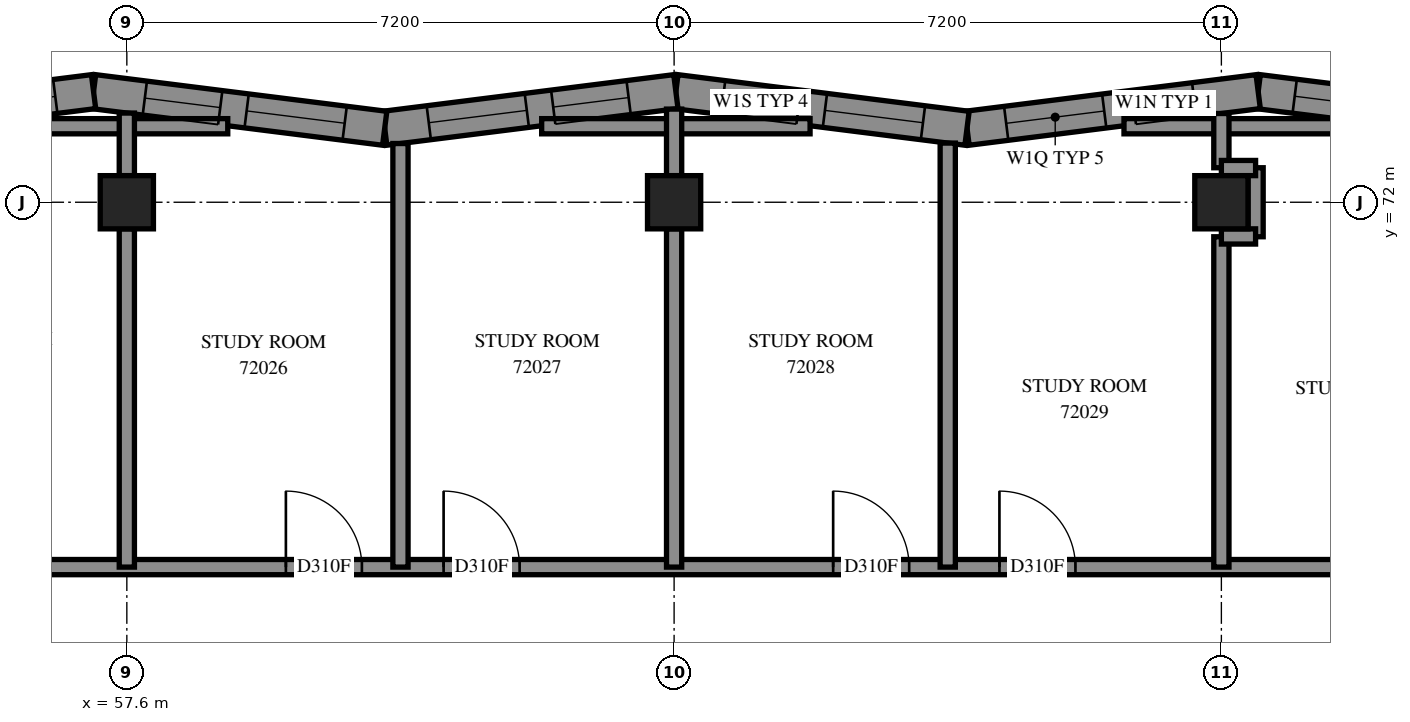
"""IFC4 building model, lengths in metres.
Left out: names, types, materials, properties, quantities, classifications, styles, units other than length and angle.
Written with IfcOpenShell. Run it as: python <this file> out.ifc"""

import sys

from ifc_helpers import new_model, si_unit, direction, frame, frame_2d, origin, origin_2d, place, context, subcontext, project, spatial, polyline, rectangle, outline, extrude, element, fill, save


model = new_model("IFC4")
c1 = context("Model", 3, precision=1e-05, world=origin(), true_north=direction((0.0, 1.0)))
c2 = subcontext(c1, "Body", "Model", "MODEL_VIEW")
j1 = project(units=[si_unit("LENGTHUNIT", "METRE"), si_unit("PLANEANGLEUNIT", "RADIAN")], contexts=[c1])
p1 = place(None, origin())
s1 = spatial("IfcSite", under=j1, at=p1, CompositionType="ELEMENT")
p2 = place(p1, origin())
s2 = spatial("IfcBuilding", under=s1, at=p2, CompositionType="ELEMENT")
p3 = place(p2, frame((0.0, 0.0, 264.2)))
s3 = spatial("IfcBuildingStorey", under=s2, at=p3, CompositionType="ELEMENT", Elevation=264.2)
for number, where, z_axis, x_axis in (
    (1, (57.6, 72.0, 0.0), (0.0, 0.0, 1.0), (1.0, 0.0, 0.0)),
    (2, (64.8, 72.0, 0.0), (0.0, 0.0, 1.0), (1.0, 0.0, 0.0)),
    (3, (72.0, 72.0, 0.0), (0.0, 0.0, 1.0), (1.0, 0.0, 0.0)),
):
    element("IfcColumn", number, at=place(p3, frame(where, z_axis=z_axis, x_axis=x_axis)), inside=s3, PredefinedType="COLUMN", context=c2, shape_type="SweptSolid", body=[
        extrude(rectangle(XDim=0.7, YDim=0.7, at=origin_2d()), origin(), (0.0, 0.0, 1.0), 3.1),
    ])
p4 = place(p3, frame((76.332, 72.971, 0.0), z_axis=(0.0, 0.0, 1.0), x_axis=(-0.9921783841, 0.1248280981, 0.0)))
e4 = element("IfcWall", 4, at=p4, inside=s3, PredefinedType="SOLIDWALL", context=c2, shape_type="SweptSolid", body=[
    extrude(outline(polyline([(0.046, -0.225), (3.906, -0.225), (3.85, 0.225), (-0.046, 0.225), (0.046, -0.225)])), origin(), (0.0, 0.0, 1.0), 3.1),
])
p5 = place(p4, frame((2.194, 0.0, 0.45)))
e5 = element("IfcOpeningElement", 5, at=p5, cuts=e4, PredefinedType="OPENING", context=c2, shape_type="SweptSolid", body=[
    extrude(rectangle(XDim=1.2, YDim=2.55, at=frame_2d((0.6, 1.275))), frame((0.0, 0.235, 0.0), z_axis=(0.0, -1.0, 0.0), x_axis=(1.0, 0.0, 0.0)), (0.0, 0.0, 1.0), 0.47),
])
p6 = place(p3, frame((72.484, 73.455, 0.0), z_axis=(0.0, 0.0, 1.0), x_axis=(-0.9921759282, -0.1248476171, 0.0)))
e6 = element("IfcWall", 6, at=p6, inside=s3, PredefinedType="SOLIDWALL", context=c2, shape_type="SweptSolid", body=[
    extrude(outline(polyline([(-0.028, -0.225), (3.832, -0.225), (3.889, 0.225), (0.028, 0.225), (-0.028, -0.225)])), origin(), (0.0, 0.0, 1.0), 3.1),
])
p7 = place(p6, frame((2.042, 0.0, 0.45)))
e7 = element("IfcOpeningElement", 7, at=p7, cuts=e6, PredefinedType="OPENING", context=c2, shape_type="SweptSolid", body=[
    extrude(rectangle(XDim=1.3, YDim=2.5, at=frame_2d((0.65, 1.25))), frame((0.0, 0.235, 0.0), z_axis=(0.0, -1.0, 0.0), x_axis=(1.0, 0.0, 0.0)), (0.0, 0.0, 1.0), 0.47),
])
p8 = place(p6, frame((0.849, 0.0, 0.45)))
e8 = element("IfcOpeningElement", 8, at=p8, cuts=e6, PredefinedType="OPENING", context=c2, shape_type="SweptSolid", body=[
    extrude(rectangle(XDim=0.8, YDim=2.5, at=frame_2d((0.4, 1.25))), frame((0.0, 0.235, 0.0), z_axis=(0.0, -1.0, 0.0), x_axis=(1.0, 0.0, 0.0)), (0.0, 0.0, 1.0), 0.47),
])
p9 = place(p3, frame((68.654, 72.973, 0.0), z_axis=(0.0, 0.0, 1.0), x_axis=(-0.9921759282, 0.1248476171, 0.0)))
e9 = element("IfcWall", 9, at=p9, inside=s3, PredefinedType="SOLIDWALL", context=c2, shape_type="SweptSolid", body=[
    extrude(outline(polyline([(0.028, -0.225), (3.889, -0.225), (3.832, 0.225), (-0.028, 0.225), (0.028, -0.225)])), origin(), (0.0, 0.0, 1.0), 3.1),
])
p10 = place(p9, frame((0.584, 0.0, 0.45)))
e10 = element("IfcOpeningElement", 10, at=p10, cuts=e9, PredefinedType="OPENING", context=c2, shape_type="SweptSolid", body=[
    extrude(rectangle(XDim=1.3, YDim=2.5, at=frame_2d((0.65, 1.25))), frame((0.0, 0.235, 0.0), z_axis=(0.0, -1.0, 0.0), x_axis=(1.0, 0.0, 0.0)), (0.0, 0.0, 1.0), 0.47),
])
p11 = place(p9, frame((2.234, 0.0, 0.45)))
e11 = element("IfcOpeningElement", 11, at=p11, cuts=e9, PredefinedType="OPENING", context=c2, shape_type="SweptSolid", body=[
    extrude(rectangle(XDim=1.0, YDim=2.5, at=frame_2d((0.5, 1.25))), frame((0.0, 0.235, 0.0), z_axis=(0.0, -1.0, 0.0), x_axis=(1.0, 0.0, 0.0)), (0.0, 0.0, 1.0), 0.47),
])
p12 = place(p3, frame((64.823, 73.455, 0.0), z_axis=(0.0, 0.0, 1.0), x_axis=(-0.9921759282, -0.1248476171, 0.0)))
e12 = element("IfcWall", 12, at=p12, inside=s3, PredefinedType="SOLIDWALL", context=c2, shape_type="SweptSolid", body=[
    extrude(outline(polyline([(-0.028, -0.225), (3.832, -0.225), (3.889, 0.225), (0.028, 0.225), (-0.028, -0.225)])), origin(), (0.0, 0.0, 1.0), 3.1),
])
p13 = place(p12, frame((0.626, 0.0, 0.45)))
e13 = element("IfcOpeningElement", 13, at=p13, cuts=e12, PredefinedType="OPENING", context=c2, shape_type="SweptSolid", body=[
    extrude(rectangle(XDim=1.0, YDim=2.5, at=frame_2d((0.5, 1.25))), frame((0.0, 0.235, 0.0), z_axis=(0.0, -1.0, 0.0), x_axis=(1.0, 0.0, 0.0)), (0.0, 0.0, 1.0), 0.47),
])
p14 = place(p12, frame((1.976, 0.0, 0.45)))
e14 = element("IfcOpeningElement", 14, at=p14, cuts=e12, PredefinedType="OPENING", context=c2, shape_type="SweptSolid", body=[
    extrude(rectangle(XDim=1.3, YDim=2.5, at=frame_2d((0.65, 1.25))), frame((0.0, 0.235, 0.0), z_axis=(0.0, -1.0, 0.0), x_axis=(1.0, 0.0, 0.0)), (0.0, 0.0, 1.0), 0.47),
])
p15 = place(p3, frame((60.993, 72.973, 0.0), z_axis=(0.0, 0.0, 1.0), x_axis=(-0.9921759282, 0.1248476171, 0.0)))
e15 = element("IfcWall", 15, at=p15, inside=s3, PredefinedType="SOLIDWALL", context=c2, shape_type="SweptSolid", body=[
    extrude(outline(polyline([(0.028, -0.225), (3.889, -0.225), (3.832, 0.225), (-0.028, 0.225), (0.028, -0.225)])), origin(), (0.0, 0.0, 1.0), 3.1),
])
p16 = place(p15, frame((0.531, 0.0, 0.45)))
e16 = element("IfcOpeningElement", 16, at=p16, cuts=e15, PredefinedType="OPENING", context=c2, shape_type="SweptSolid", body=[
    extrude(rectangle(XDim=1.3, YDim=2.5, at=frame_2d((0.65, 1.25))), frame((0.0, 0.235, 0.0), z_axis=(0.0, -1.0, 0.0), x_axis=(1.0, 0.0, 0.0)), (0.0, 0.0, 1.0), 0.47),
])
p17 = place(p15, frame((2.181, 0.0, 0.45)))
e17 = element("IfcOpeningElement", 17, at=p17, cuts=e15, PredefinedType="OPENING", context=c2, shape_type="SweptSolid", body=[
    extrude(rectangle(XDim=1.0, YDim=2.5, at=frame_2d((0.5, 1.25))), frame((0.0, 0.235, 0.0), z_axis=(0.0, -1.0, 0.0), x_axis=(1.0, 0.0, 0.0)), (0.0, 0.0, 1.0), 0.47),
])
p18 = place(p3, frame((57.162, 73.455, 0.0), z_axis=(0.0, 0.0, 1.0), x_axis=(-0.9921763319, -0.1248444087, 0.0)))
e18 = element("IfcWall", 18, at=p18, inside=s3, PredefinedType="SOLIDWALL", context=c2, shape_type="SweptSolid", body=[
    extrude(outline(polyline([(-0.028, -0.225), (3.832, -0.225), (3.889, 0.225), (0.028, 0.225), (-0.028, -0.225)])), origin(), (0.0, 0.0, 1.0), 3.1),
])
p19 = place(p18, frame((0.508, 0.0, 0.45)))
e19 = element("IfcOpeningElement", 19, at=p19, cuts=e18, PredefinedType="OPENING", context=c2, shape_type="SweptSolid", body=[
    extrude(rectangle(XDim=1.2, YDim=2.55, at=frame_2d((0.6, 1.275))), frame((0.0, 0.235, 0.0), z_axis=(0.0, -1.0, 0.0), x_axis=(1.0, 0.0, 0.0)), (0.0, 0.0, 1.0), 0.47),
])
p20 = place(p3, frame((55.2, 67.2, 0.0), z_axis=(0.0, 0.0, 1.0), x_axis=(1.0, 0.0, 0.0)))
e20 = element("IfcWall", 20, at=p20, inside=s3, PredefinedType="PARTITIONING", context=c2, shape_type="SweptSolid", body=[
    extrude(rectangle(XDim=19.2, YDim=0.2, at=frame_2d((9.6, 0.0))), origin(), (0.0, 0.0, 1.0), 3.1),
])
p21 = place(p20, frame((4.492, 0.0, 0.0)))
e21 = element("IfcOpeningElement", 21, at=p21, cuts=e20, PredefinedType="OPENING", context=c2, shape_type="SweptSolid", body=[
    extrude(rectangle(XDim=1.0, YDim=2.1, at=frame_2d((0.5, 1.05))), frame((0.0, 0.11, 0.0), z_axis=(0.0, -1.0, 0.0), x_axis=(1.0, 0.0, 0.0)), (0.0, 0.0, 1.0), 0.22),
])
p22 = place(p20, frame((6.567, 0.0, 0.0)))
e22 = element("IfcOpeningElement", 22, at=p22, cuts=e20, PredefinedType="OPENING", context=c2, shape_type="SweptSolid", body=[
    extrude(rectangle(XDim=1.0, YDim=2.1, at=frame_2d((0.5, 1.05))), frame((0.0, 0.11, 0.0), z_axis=(0.0, -1.0, 0.0), x_axis=(1.0, 0.0, 0.0)), (0.0, 0.0, 1.0), 0.22),
])
p23 = place(p20, frame((11.693, 0.0, 0.0)))
e23 = element("IfcOpeningElement", 23, at=p23, cuts=e20, PredefinedType="OPENING", context=c2, shape_type="SweptSolid", body=[
    extrude(rectangle(XDim=1.0, YDim=2.1, at=frame_2d((0.5, 1.05))), frame((0.0, 0.11, 0.0), z_axis=(0.0, -1.0, 0.0), x_axis=(1.0, 0.0, 0.0)), (0.0, 0.0, 1.0), 0.22),
])
p24 = place(p20, frame((13.88, 0.0, 0.0)))
e24 = element("IfcOpeningElement", 24, at=p24, cuts=e20, PredefinedType="OPENING", context=c2, shape_type="SweptSolid", body=[
    extrude(rectangle(XDim=1.0, YDim=2.1, at=frame_2d((0.5, 1.05))), frame((0.0, 0.11, 0.0), z_axis=(0.0, -1.0, 0.0), x_axis=(1.0, 0.0, 0.0)), (0.0, 0.0, 1.0), 0.22),
])
p25 = place(p3, frame((68.4, 67.2, 0.0), z_axis=(0.0, 0.0, 1.0), x_axis=(0.0, 1.0, 0.0)))
e25 = element("IfcWall", 25, at=p25, inside=s3, PredefinedType="PARTITIONING", context=c2, shape_type="SweptSolid", body=[
    extrude(rectangle(XDim=5.578, YDim=0.2, at=frame_2d((2.789, 0.0))), origin(), (0.0, 0.0, 1.0), 3.1),
])
p26 = place(p3, frame((61.2, 67.2, 0.0), z_axis=(0.0, 0.0, 1.0), x_axis=(0.0, 1.0, 0.0)))
e26 = element("IfcWall", 26, at=p26, inside=s3, PredefinedType="PARTITIONING", context=c2, shape_type="SweptSolid", body=[
    extrude(rectangle(XDim=5.572, YDim=0.2, at=frame_2d((2.786, 0.0))), origin(), (0.0, 0.0, 1.0), 3.1),
])
for number, where, z_axis, x_axis in (
    (27, (57.6, 67.2, 0.0), (0.0, 0.0, 1.0), (0.0, 1.0, 0.0)),
    (28, (64.8, 67.2, 0.0), (0.0, 0.0, 1.0), (0.0, 1.0, 0.0)),
):
    element("IfcWall", number, at=place(p3, frame(where, z_axis=z_axis, x_axis=x_axis)), inside=s3, PredefinedType="PARTITIONING", context=c2, shape_type="SweptSolid", body=[
        extrude(rectangle(XDim=4.45, YDim=0.2, at=frame_2d((2.225, 0.0))), origin(), (0.0, 0.0, 1.0), 3.1),
    ])
p27 = place(p3, frame((72.0, 67.2, 0.0), z_axis=(0.0, 0.0, 1.0), x_axis=(0.0, 1.0, 0.0)))
e29 = element("IfcWall", 29, at=p27, inside=s3, PredefinedType="PARTITIONING", context=c2, shape_type="SweptSolid", body=[
    extrude(rectangle(XDim=4.346, YDim=0.2, at=frame_2d((2.173, 0.0))), origin(), (0.0, 0.0, 1.0), 3.1),
])
for number, where, z_axis, x_axis in (
    (30, (70.719, 73.0, 0.0), (0.0, 0.0, 1.0), (1.0, 0.0, 0.0)),
    (31, (55.397, 73.0, 0.0), (0.0, 0.0, 1.0), (1.0, 0.0, 0.0)),
):
    element("IfcWall", number, at=place(p3, frame(where, z_axis=z_axis, x_axis=x_axis)), inside=s3, PredefinedType="PARTITIONING", context=c2, shape_type="SweptSolid", body=[
        extrude(rectangle(XDim=3.531, YDim=0.2, at=frame_2d((1.766, 0.0))), origin(), (0.0, 0.0, 1.0), 3.1),
    ])
p28 = place(p3, frame((63.058, 73.0, 0.0), z_axis=(0.0, 0.0, 1.0), x_axis=(1.0, 0.0, 0.0)))
e32 = element("IfcWall", 32, at=p28, inside=s3, PredefinedType="PARTITIONING", context=c2, shape_type="SweptSolid", body=[
    extrude(rectangle(XDim=3.531, YDim=0.2, at=frame_2d((1.766, 0.0))), origin(), (0.0, 0.0, 1.0), 3.1),
])
p29 = place(p3, frame((72.45, 71.546, 0.0), z_axis=(0.0, 0.0, 1.0), x_axis=(0.0, 1.0, 0.0)))
e33 = element("IfcWall", 33, at=p29, inside=s3, PredefinedType="PARTITIONING", context=c2, shape_type="SweptSolid", body=[
    extrude(rectangle(XDim=0.908, YDim=0.2, at=frame_2d((0.454, 0.0))), origin(), (0.0, 0.0, 1.0), 3.1),
])
p30 = place(p3, frame((57.6, 72.35, 0.0), z_axis=(0.0, 0.0, 1.0), x_axis=(0.0, 1.0, 0.0)))
e34 = element("IfcWall", 34, at=p30, inside=s3, PredefinedType="PARTITIONING", context=c2, shape_type="SweptSolid", body=[
    extrude(rectangle(XDim=0.823, YDim=0.2, at=frame_2d((0.412, 0.0))), origin(), (0.0, 0.0, 1.0), 3.1),
])
p31 = place(p3, frame((64.8, 72.35, 0.0), z_axis=(0.0, 0.0, 1.0), x_axis=(0.0, 1.0, 0.0)))
e35 = element("IfcWall", 35, at=p31, inside=s3, PredefinedType="PARTITIONING", context=c2, shape_type="SweptSolid", body=[
    extrude(rectangle(XDim=0.875, YDim=0.2, at=frame_2d((0.438, 0.0))), origin(), (0.0, 0.0, 1.0), 3.1),
])
p32 = place(p3, frame((72.0, 72.454, 0.0), z_axis=(0.0, 0.0, 1.0), x_axis=(0.0, 1.0, 0.0)))
e36 = element("IfcWall", 36, at=p32, inside=s3, PredefinedType="PARTITIONING", context=c2, shape_type="SweptSolid", body=[
    extrude(rectangle(XDim=0.714, YDim=0.2, at=frame_2d((0.357, 0.0))), origin(), (0.0, 0.0, 1.0), 3.1),
])
for number, where, z_axis, x_axis in (
    (37, (72.0, 71.55, 0.0), (0.0, 0.0, 1.0), (1.0, 0.0, 0.0)),
    (38, (72.0, 72.45, 0.0), (0.0, 0.0, 1.0), (1.0, 0.0, 0.0)),
):
    element("IfcWall", number, at=place(p3, frame(where, z_axis=z_axis, x_axis=x_axis)), inside=s3, PredefinedType="PARTITIONING", context=c2, shape_type="SweptSolid", body=[
        extrude(rectangle(XDim=0.45, YDim=0.2, at=frame_2d((0.225, 0.0))), origin(), (0.0, 0.0, 1.0), 3.1),
    ])
p33 = place(p5, origin())
e39 = element("IfcWindow", 39, at=p33, inside=s3, PartitioningType="SINGLE_PANEL", PredefinedType="WINDOW", context=c2, shape_type="SweptSolid", body=[
    extrude(rectangle(XDim=1.2, YDim=2.55, at=frame_2d((0.6, 1.275))), frame((0.0, 0.115, 0.0), z_axis=(0.0, -1.0, 0.0), x_axis=(1.0, 0.0, 0.0)), (0.0, 0.0, 1.0), 0.06),
])
fill(e5, e39)
p34 = place(p19, origin())
e40 = element("IfcWindow", 40, at=p34, inside=s3, PartitioningType="SINGLE_PANEL", PredefinedType="WINDOW", context=c2, shape_type="SweptSolid", body=[
    extrude(rectangle(XDim=1.2, YDim=2.55, at=frame_2d((0.6, 1.275))), frame((0.0, 0.105, 0.0), z_axis=(0.0, -1.0, 0.0), x_axis=(1.0, 0.0, 0.0)), (0.0, 0.0, 1.0), 0.06),
])
fill(e19, e40)
p35 = place(p21, origin())
e41 = element("IfcDoor", 41, at=p35, inside=s3, OperationType="SINGLE_SWING_RIGHT", PredefinedType="DOOR", context=c2, shape_type="SweptSolid", body=[
    extrude(rectangle(XDim=1.0, YDim=2.1, at=frame_2d((0.5, 1.05))), frame((0.0, 0.025, 0.0), z_axis=(0.0, -1.0, 0.0), x_axis=(1.0, 0.0, 0.0)), (0.0, 0.0, 1.0), 0.05),
])
fill(e21, e41)
p36 = place(p22, origin())
e42 = element("IfcDoor", 42, at=p36, inside=s3, OperationType="SINGLE_SWING_LEFT", PredefinedType="DOOR", context=c2, shape_type="SweptSolid", body=[
    extrude(rectangle(XDim=1.0, YDim=2.1, at=frame_2d((0.5, 1.05))), frame((0.0, 0.025, 0.0), z_axis=(0.0, -1.0, 0.0), x_axis=(1.0, 0.0, 0.0)), (0.0, 0.0, 1.0), 0.05),
])
fill(e22, e42)
p37 = place(p23, origin())
e43 = element("IfcDoor", 43, at=p37, inside=s3, OperationType="SINGLE_SWING_RIGHT", PredefinedType="DOOR", context=c2, shape_type="SweptSolid", body=[
    extrude(rectangle(XDim=1.0, YDim=2.1, at=frame_2d((0.5, 1.05))), frame((0.0, 0.025, 0.0), z_axis=(0.0, -1.0, 0.0), x_axis=(1.0, 0.0, 0.0)), (0.0, 0.0, 1.0), 0.05),
])
fill(e23, e43)
p38 = place(p24, origin())
e44 = element("IfcDoor", 44, at=p38, inside=s3, OperationType="SINGLE_SWING_LEFT", PredefinedType="DOOR", context=c2, shape_type="SweptSolid", body=[
    extrude(rectangle(XDim=1.0, YDim=2.1, at=frame_2d((0.5, 1.05))), frame((0.0, 0.025, 0.0), z_axis=(0.0, -1.0, 0.0), x_axis=(1.0, 0.0, 0.0)), (0.0, 0.0, 1.0), 0.05),
])
fill(e24, e44)
p39 = place(p7, origin())
e45 = element("IfcWindow", 45, at=p39, inside=s3, PartitioningType="SINGLE_PANEL", PredefinedType="WINDOW", context=c2, shape_type="SweptSolid", body=[
    extrude(rectangle(XDim=1.3, YDim=2.5, at=frame_2d((0.65, 1.25))), frame((0.0, 0.205, 0.0), z_axis=(0.0, -1.0, 0.0), x_axis=(1.0, 0.0, 0.0)), (0.0, 0.0, 1.0), 0.06),
])
fill(e7, e45)
p40 = place(p10, origin())
e46 = element("IfcWindow", 46, at=p40, inside=s3, PartitioningType="SINGLE_PANEL", PredefinedType="WINDOW", context=c2, shape_type="SweptSolid", body=[
    extrude(rectangle(XDim=1.3, YDim=2.5, at=frame_2d((0.65, 1.25))), frame((0.0, 0.205, 0.0), z_axis=(0.0, -1.0, 0.0), x_axis=(1.0, 0.0, 0.0)), (0.0, 0.0, 1.0), 0.06),
])
fill(e10, e46)
p41 = place(p11, origin())
e47 = element("IfcWindow", 47, at=p41, inside=s3, PartitioningType="SINGLE_PANEL", PredefinedType="WINDOW", context=c2, shape_type="SweptSolid", body=[
    extrude(rectangle(XDim=1.0, YDim=2.5, at=frame_2d((0.5, 1.25))), frame((0.0, 0.115, 0.0), z_axis=(0.0, -1.0, 0.0), x_axis=(1.0, 0.0, 0.0)), (0.0, 0.0, 1.0), 0.06),
])
fill(e11, e47)
p42 = place(p13, origin())
e48 = element("IfcWindow", 48, at=p42, inside=s3, PartitioningType="SINGLE_PANEL", PredefinedType="WINDOW", context=c2, shape_type="SweptSolid", body=[
    extrude(rectangle(XDim=1.0, YDim=2.5, at=frame_2d((0.5, 1.25))), frame((0.0, 0.115, 0.0), z_axis=(0.0, -1.0, 0.0), x_axis=(1.0, 0.0, 0.0)), (0.0, 0.0, 1.0), 0.06),
])
fill(e13, e48)
p43 = place(p14, origin())
e49 = element("IfcWindow", 49, at=p43, inside=s3, PartitioningType="SINGLE_PANEL", PredefinedType="WINDOW", context=c2, shape_type="SweptSolid", body=[
    extrude(rectangle(XDim=1.3, YDim=2.5, at=frame_2d((0.65, 1.25))), frame((0.0, 0.205, 0.0), z_axis=(0.0, -1.0, 0.0), x_axis=(1.0, 0.0, 0.0)), (0.0, 0.0, 1.0), 0.06),
])
fill(e14, e49)
p44 = place(p16, origin())
e50 = element("IfcWindow", 50, at=p44, inside=s3, PartitioningType="SINGLE_PANEL", PredefinedType="WINDOW", context=c2, shape_type="SweptSolid", body=[
    extrude(rectangle(XDim=1.3, YDim=2.5, at=frame_2d((0.65, 1.25))), frame((0.0, 0.205, 0.0), z_axis=(0.0, -1.0, 0.0), x_axis=(1.0, 0.0, 0.0)), (0.0, 0.0, 1.0), 0.06),
])
fill(e16, e50)
p45 = place(p17, origin())
e51 = element("IfcWindow", 51, at=p45, inside=s3, PartitioningType="SINGLE_PANEL", PredefinedType="WINDOW", context=c2, shape_type="SweptSolid", body=[
    extrude(rectangle(XDim=1.0, YDim=2.5, at=frame_2d((0.5, 1.25))), frame((0.0, 0.115, 0.0), z_axis=(0.0, -1.0, 0.0), x_axis=(1.0, 0.0, 0.0)), (0.0, 0.0, 1.0), 0.06),
])
fill(e17, e51)
p46 = place(p8, origin())
e52 = element("IfcWindow", 52, at=p46, inside=s3, PartitioningType="SINGLE_PANEL", PredefinedType="WINDOW", context=c2, shape_type="SweptSolid", body=[
    extrude(rectangle(XDim=0.8, YDim=2.5, at=frame_2d((0.4, 1.25))), frame((0.0, 0.115, 0.0), z_axis=(0.0, -1.0, 0.0), x_axis=(1.0, 0.0, 0.0)), (0.0, 0.0, 1.0), 0.06),
])
fill(e8, e52)
save(model, sys.argv[1])
